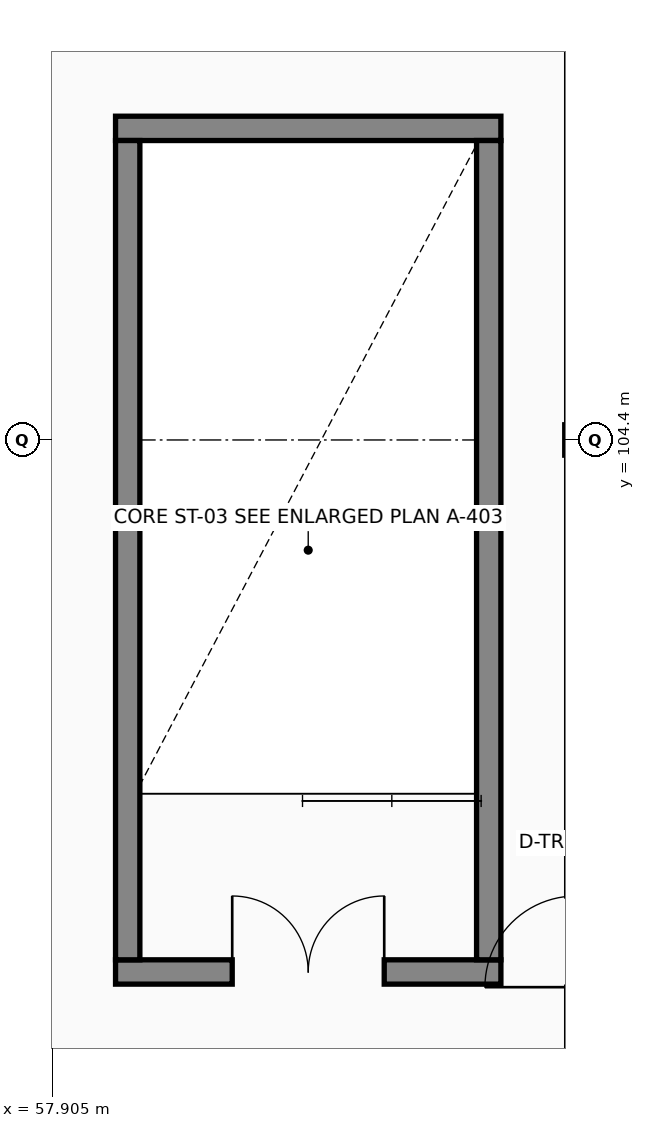
"""IFC4 building model, lengths in metres.
Left out: names, types, materials, properties, quantities, classifications, styles, units other than length and angle.
Written with IfcOpenShell. Run it as: python <this file> out.ifc"""

import sys

from ifc_helpers import new_model, si_unit, direction, frame, frame_2d, origin, place, context, subcontext, project, spatial, rectangle, extrude, element, fill, save


model = new_model("IFC4")
c1 = context("Model", 3, precision=1e-05, world=origin(), true_north=direction((0.0, 1.0)))
c2 = subcontext(c1, "Body", "Model", "MODEL_VIEW")
j1 = project(units=[si_unit("LENGTHUNIT", "METRE"), si_unit("PLANEANGLEUNIT", "RADIAN")], contexts=[c1])
p1 = place(None, origin())
s1 = spatial("IfcSite", under=j1, at=p1, CompositionType="ELEMENT")
p2 = place(p1, origin())
s2 = spatial("IfcBuilding", under=s1, at=p2, CompositionType="ELEMENT")
p3 = place(p2, frame((0.0, 0.0, 14.4)))
s3 = spatial("IfcBuildingStorey", under=s2, at=p3, CompositionType="ELEMENT", Elevation=14.4)
p4 = place(p3, frame((58.74, 97.4, 0.0), z_axis=(0.0, 0.0, 1.0), x_axis=(1.0, 0.0, 0.0)))
e1 = element("IfcWall", 1, at=p4, inside=s3, PredefinedType="SHEAR", context=c2, shape_type="SweptSolid", body=[
    extrude(rectangle(XDim=5.07, YDim=0.32, at=frame_2d((2.535, 0.0))), origin(), (0.0, 0.0, 1.0), 4.0),
])
p5 = place(p4, frame((1.535, 0.0, 0.0)))
e2 = element("IfcOpeningElement", 2, at=p5, cuts=e1, PredefinedType="OPENING", context=c2, shape_type="SweptSolid", body=[
    extrude(rectangle(XDim=2.0, YDim=2.15, at=frame_2d((1.0, 1.075))), frame((0.0, 0.17, 0.0), z_axis=(0.0, -1.0, 0.0), x_axis=(1.0, 0.0, 0.0)), (0.0, 0.0, 1.0), 0.34),
])
p6 = place(p3, frame((58.74, 108.5, 0.0), z_axis=(0.0, 0.0, 1.0), x_axis=(1.0, 0.0, 0.0)))
e3 = element("IfcWall", 3, at=p6, inside=s3, PredefinedType="SHEAR", context=c2, shape_type="SweptSolid", body=[
    extrude(rectangle(XDim=5.07, YDim=0.32, at=frame_2d((2.535, 0.0))), origin(), (0.0, 0.0, 1.0), 4.0),
])
for number, where, z_axis, x_axis in (
    (4, (58.9, 97.56, 0.0), (0.0, 0.0, 1.0), (0.0, 1.0, 0.0)),
    (5, (63.65, 97.56, 0.0), (0.0, 0.0, 1.0), (0.0, 1.0, 0.0)),
):
    element("IfcWall", number, at=place(p3, frame(where, z_axis=z_axis, x_axis=x_axis)), inside=s3, PredefinedType="SHEAR", context=c2, shape_type="SweptSolid", body=[
        extrude(rectangle(XDim=10.78, YDim=0.32, at=frame_2d((5.39, 0.0))), origin(), (0.0, 0.0, 1.0), 4.0),
    ])
p7 = place(p5, origin())
e6 = element("IfcDoor", 6, at=p7, inside=s3, OperationType="DOUBLE_DOOR_SINGLE_SWING", PredefinedType="DOOR", context=c2, shape_type="SweptSolid", body=[
    extrude(rectangle(XDim=2.0, YDim=2.15, at=frame_2d((1.0, 1.075))), frame((0.0, 0.025, 0.0), z_axis=(0.0, -1.0, 0.0), x_axis=(1.0, 0.0, 0.0)), (0.0, 0.0, 1.0), 0.05),
])
fill(e2, e6)
save(model, sys.argv[1])
